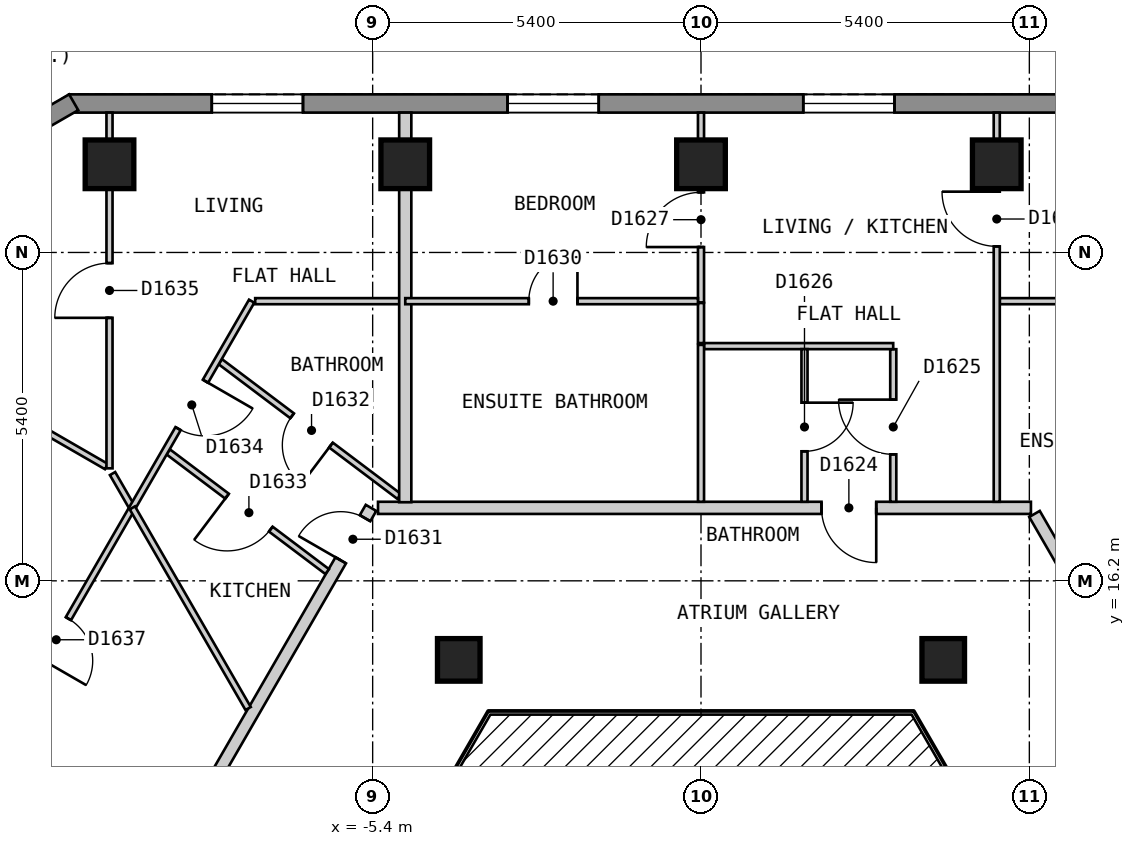
"""IFC4 building model, lengths in metres.
Left out: names, types, materials, properties, quantities, classifications, styles, units other than length and angle.
Written with IfcOpenShell. Run it as: python <this file> out.ifc"""

import sys

from ifc_helpers import new_model, si_unit, direction, frame, frame_2d, origin, origin_2d, place, context, subcontext, project, spatial, polyline, rectangle, outline, extrude, element, fill, save


model = new_model("IFC4")
c1 = context("Model", 3, precision=1e-05, world=origin(), true_north=direction((0.0, 1.0)))
c2 = subcontext(c1, "Body", "Model", "MODEL_VIEW")
j1 = project(units=[si_unit("LENGTHUNIT", "METRE"), si_unit("PLANEANGLEUNIT", "RADIAN")], contexts=[c1])
p1 = place(None, origin())
s1 = spatial("IfcSite", under=j1, at=p1, CompositionType="ELEMENT")
p2 = place(p1, origin())
s2 = spatial("IfcBuilding", under=s1, at=p2, CompositionType="ELEMENT")
p3 = place(p2, frame((0.0, 0.0, 169.2)))
s3 = spatial("IfcBuildingStorey", under=s2, at=p3, CompositionType="ELEMENT", Elevation=169.2)
for number, where, z_axis, x_axis in (
    (1, (4.864, 23.05, 0.0), (0.0, 0.0, 1.0), (-1.0, 0.0, 0.0)),
    (2, (0.0, 23.05, 0.0), (0.0, 0.0, 1.0), (-1.0, 0.0, 0.0)),
    (3, (-4.864, 23.05, 0.0), (0.0, 0.0, 1.0), (-1.0, 0.0, 0.0)),
    (4, (-9.728, 23.05, 0.0), (0.0, 0.0, 1.0), (-1.0, 0.0, 0.0)),
):
    element("IfcColumn", number, at=place(p3, frame(where, z_axis=z_axis, x_axis=x_axis)), inside=s3, PredefinedType="COLUMN", context=c2, shape_type="SweptSolid", body=[
        extrude(rectangle(XDim=0.8, YDim=0.8, at=origin_2d()), origin(), (0.0, 0.0, 1.0), 3.0),
    ])
for number, where, z_axis, x_axis in (
    (5, (3.984, 14.9, 0.0), (0.0, 0.0, 1.0), (1.0, 0.0, 0.0)),
    (6, (-3.984, 14.9, 0.0), (0.0, 0.0, 1.0), (1.0, 0.0, 0.0)),
):
    element("IfcColumn", number, at=place(p3, frame(where, z_axis=z_axis, x_axis=x_axis)), inside=s3, PredefinedType="COLUMN", context=c2, shape_type="SweptSolid", body=[
        extrude(rectangle(XDim=0.7, YDim=0.7, at=origin_2d()), origin(), (0.0, 0.0, 1.0), 3.0),
    ])
p4 = place(p3, frame((10.392, 24.05, 0.0), z_axis=(0.0, 0.0, 1.0), x_axis=(-1.0, 0.0, 0.0)))
e7 = element("IfcWall", 7, at=p4, inside=s3, PredefinedType="SOLIDWALL", context=c2, shape_type="SweptSolid", body=[
    extrude(outline(polyline([(0.0, -0.15), (20.784, -0.15), (20.704, 0.15), (0.08, 0.15), (0.0, -0.15)])), origin(), (0.0, 0.0, 1.0), 2.7),
])
p5 = place(p4, frame((2.346, 0.0, 0.15)))
e8 = element("IfcOpeningElement", 8, at=p5, cuts=e7, PredefinedType="OPENING", context=c2, shape_type="SweptSolid", body=[
    extrude(rectangle(XDim=1.5, YDim=2.1, at=frame_2d((0.75, 1.05))), frame((0.0, 0.16, 0.0), z_axis=(0.0, -1.0, 0.0), x_axis=(1.0, 0.0, 0.0)), (0.0, 0.0, 1.0), 0.32),
])
p6 = place(p4, frame((7.21, 0.0, 0.15)))
e9 = element("IfcOpeningElement", 9, at=p6, cuts=e7, PredefinedType="OPENING", context=c2, shape_type="SweptSolid", body=[
    extrude(rectangle(XDim=1.5, YDim=2.1, at=frame_2d((0.75, 1.05))), frame((0.0, 0.16, 0.0), z_axis=(0.0, -1.0, 0.0), x_axis=(1.0, 0.0, 0.0)), (0.0, 0.0, 1.0), 0.32),
])
p7 = place(p4, frame((12.074, 0.0, 0.15)))
e10 = element("IfcOpeningElement", 10, at=p7, cuts=e7, PredefinedType="OPENING", context=c2, shape_type="SweptSolid", body=[
    extrude(rectangle(XDim=1.5, YDim=2.1, at=frame_2d((0.75, 1.05))), frame((0.0, 0.16, 0.0), z_axis=(0.0, -1.0, 0.0), x_axis=(1.0, 0.0, 0.0)), (0.0, 0.0, 1.0), 0.32),
])
p8 = place(p4, frame((16.938, 0.0, 0.15)))
e11 = element("IfcOpeningElement", 11, at=p8, cuts=e7, PredefinedType="OPENING", context=c2, shape_type="SweptSolid", body=[
    extrude(rectangle(XDim=1.5, YDim=2.1, at=frame_2d((0.75, 1.05))), frame((0.0, 0.16, 0.0), z_axis=(0.0, -1.0, 0.0), x_axis=(1.0, 0.0, 0.0)), (0.0, 0.0, 1.0), 0.32),
])
p9 = place(p3, frame((-10.317, 24.07, 0.0), z_axis=(0.0, 0.0, 1.0), x_axis=(-0.866022959057, -0.500004234368, 0.0)))
e12 = element("IfcWall", 12, at=p9, inside=s3, PredefinedType="SOLIDWALL", context=c2, shape_type="SweptSolid", body=[
    extrude(outline(polyline([(0.0, -0.15), (5.0, -0.15), (4.92, 0.15), (0.08, 0.15), (0.0, -0.15)])), origin(), (0.0, 0.0, 1.0), 2.7),
])
p10 = place(p9, frame((0.65, 0.0, 0.15)))
e13 = element("IfcOpeningElement", 13, at=p10, cuts=e12, PredefinedType="OPENING", context=c2, shape_type="SweptSolid", body=[
    extrude(rectangle(XDim=1.2, YDim=2.1, at=frame_2d((0.6, 1.05))), frame((0.0, 0.16, 0.0), z_axis=(0.0, -1.0, 0.0), x_axis=(1.0, 0.0, 0.0)), (0.0, 0.0, 1.0), 0.32),
])
p11 = place(p3, frame((5.485, 17.3, 0.0), z_axis=(0.0, 0.0, 1.0), x_axis=(0.499965832213, -0.866045129667, 0.0)))
e14 = element("IfcWall", 14, at=p11, inside=s3, PredefinedType="PARTITIONING", context=c2, shape_type="SweptSolid", body=[
    extrude(rectangle(XDim=10.739, YDim=0.2, at=frame_2d((5.369, 0.0))), origin(), (0.0, 0.0, 1.0), 2.7),
])
p12 = place(p11, frame((9.047, 0.0, 0.0)))
e15 = element("IfcOpeningElement", 15, at=p12, cuts=e14, PredefinedType="OPENING", context=c2, shape_type="SweptSolid", body=[
    extrude(rectangle(XDim=1.0, YDim=2.1, at=frame_2d((0.5, 1.05))), frame((0.0, 0.11, 0.0), z_axis=(0.0, -1.0, 0.0), x_axis=(1.0, 0.0, 0.0)), (0.0, 0.0, 1.0), 0.22),
])
p13 = place(p3, frame((-5.312, 17.4, 0.0), z_axis=(0.0, 0.0, 1.0), x_axis=(1.0, 0.0, 0.0)))
e16 = element("IfcWall", 16, at=p13, inside=s3, PredefinedType="PARTITIONING", context=c2, shape_type="SweptSolid", body=[
    extrude(rectangle(XDim=10.738, YDim=0.2, at=frame_2d((5.369, 0.0))), origin(), (0.0, 0.0, 1.0), 2.7),
])
p14 = place(p13, frame((7.294, 0.0, 0.0)))
e17 = element("IfcOpeningElement", 17, at=p14, cuts=e16, PredefinedType="OPENING", context=c2, shape_type="SweptSolid", body=[
    extrude(rectangle(XDim=0.9, YDim=2.1, at=frame_2d((0.45, 1.05))), frame((0.0, 0.11, 0.0), z_axis=(0.0, -1.0, 0.0), x_axis=(1.0, 0.0, 0.0)), (0.0, 0.0, 1.0), 0.22),
])
p15 = place(p3, frame((-10.771, 8.144, 0.0), z_axis=(0.0, 0.0, 1.0), x_axis=(0.500008507724, 0.866020491792, 0.0)))
e18 = element("IfcWall", 18, at=p15, inside=s3, PredefinedType="PARTITIONING", context=c2, shape_type="SweptSolid", body=[
    extrude(rectangle(XDim=10.688, YDim=0.2, at=frame_2d((5.344, 0.0))), origin(), (0.0, 0.0, 1.0), 2.7),
])
p16 = place(p15, frame((9.692, 0.0, 0.0)))
e19 = element("IfcOpeningElement", 19, at=p16, cuts=e18, PredefinedType="OPENING", context=c2, shape_type="SweptSolid", body=[
    extrude(rectangle(XDim=0.8, YDim=2.1, at=frame_2d((0.4, 1.05))), frame((0.0, 0.11, 0.0), z_axis=(0.0, -1.0, 0.0), x_axis=(1.0, 0.0, 0.0)), (0.0, 0.0, 1.0), 0.22),
])
p17 = place(p15, frame((0.549, 0.0, 0.0)))
e20 = element("IfcOpeningElement", 20, at=p17, cuts=e18, PredefinedType="OPENING", context=c2, shape_type="SweptSolid", body=[
    extrude(rectangle(XDim=1.0, YDim=2.1, at=frame_2d((0.5, 1.05))), frame((0.0, 0.11, 0.0), z_axis=(0.0, -1.0, 0.0), x_axis=(1.0, 0.0, 0.0)), (0.0, 0.0, 1.0), 0.22),
])
p18 = place(p3, frame((-9.678, 17.964, 0.0), z_axis=(0.0, 0.0, 1.0), x_axis=(0.500208928872, -0.865904745036, 0.0)))
e21 = element("IfcWall", 21, at=p18, inside=s3, PredefinedType="PARTITIONING", context=c2, shape_type="SweptSolid", body=[
    extrude(rectangle(XDim=0.652, YDim=0.1, at=frame_2d((0.326, 0.0))), origin(), (0.0, 0.0, 1.0), 2.7),
])
p19 = place(p3, frame((0.0, 20.769, 0.0), z_axis=(0.0, 0.0, 1.0), x_axis=(0.0, -1.0, 0.0)))
e22 = element("IfcWall", 22, at=p19, inside=s3, PredefinedType="PARTITIONING", context=c2, shape_type="SweptSolid", body=[
    extrude(rectangle(XDim=0.659, YDim=0.1, at=frame_2d((0.33, 0.0))), origin(), (0.0, 0.0, 1.0), 2.7),
])
p20 = place(p3, frame((3.162, 20.009, 0.0), z_axis=(0.0, 0.0, 1.0), x_axis=(0.0, -1.0, 0.0)))
e23 = element("IfcWall", 23, at=p20, inside=s3, PredefinedType="PARTITIONING", context=c2, shape_type="SweptSolid", body=[
    extrude(rectangle(XDim=2.509, YDim=0.1, at=frame_2d((1.254, 0.0))), origin(), (0.0, 0.0, 1.0), 2.7),
])
p21 = place(p20, frame((0.829, 0.0, 0.0)))
e24 = element("IfcOpeningElement", 24, at=p21, cuts=e23, PredefinedType="OPENING", context=c2, shape_type="SweptSolid", body=[
    extrude(rectangle(XDim=0.9, YDim=2.1, at=frame_2d((0.45, 1.05))), frame((0.0, 0.06, 0.0), z_axis=(0.0, -1.0, 0.0), x_axis=(1.0, 0.0, 0.0)), (0.0, 0.0, 1.0), 0.12),
])
p22 = place(p3, frame((-14.794, 20.975, 0.0), z_axis=(0.0, 0.0, 1.0), x_axis=(0.866019221245, -0.500010708319, 0.0)))
e25 = element("IfcWall", 25, at=p22, inside=s3, PredefinedType="PARTITIONING", context=c2, shape_type="SweptSolid", body=[
    extrude(rectangle(XDim=5.792, YDim=0.1, at=frame_2d((2.896, 0.0))), origin(), (0.0, 0.0, 1.0), 2.7),
])
p23 = place(p22, frame((2.475, 0.0, 0.0)))
e26 = element("IfcOpeningElement", 26, at=p23, cuts=e25, PredefinedType="OPENING", context=c2, shape_type="SweptSolid", body=[
    extrude(rectangle(XDim=0.9, YDim=2.1, at=frame_2d((0.45, 1.05))), frame((0.0, 0.06, 0.0), z_axis=(0.0, -1.0, 0.0), x_axis=(1.0, 0.0, 0.0)), (0.0, 0.0, 1.0), 0.12),
])
p24 = place(p3, frame((-8.763, 18.321, 0.0), z_axis=(0.0, 0.0, 1.0), x_axis=(0.798861914713, -0.601514456369, 0.0)))
e27 = element("IfcWall", 27, at=p24, inside=s3, PredefinedType="PARTITIONING", context=c2, shape_type="SweptSolid", body=[
    extrude(rectangle(XDim=3.273, YDim=0.1, at=frame_2d((1.637, 0.0))), origin(), (0.0, 0.0, 1.0), 2.7),
])
p25 = place(p24, frame((1.212, 0.0, 0.0)))
e28 = element("IfcOpeningElement", 28, at=p25, cuts=e27, PredefinedType="OPENING", context=c2, shape_type="SweptSolid", body=[
    extrude(rectangle(XDim=0.9, YDim=2.1, at=frame_2d((0.45, 1.05))), frame((0.0, 0.06, 0.0), z_axis=(0.0, -1.0, 0.0), x_axis=(1.0, 0.0, 0.0)), (0.0, 0.0, 1.0), 0.12),
])
p26 = place(p3, frame((-7.906, 19.804, 0.0), z_axis=(0.0, 0.0, 1.0), x_axis=(0.798741470056, -0.60167438371, 0.0)))
e29 = element("IfcWall", 29, at=p26, inside=s3, PredefinedType="PARTITIONING", context=c2, shape_type="SweptSolid", body=[
    extrude(rectangle(XDim=3.683, YDim=0.1, at=frame_2d((1.842, 0.0))), origin(), (0.0, 0.0, 1.0), 2.7),
])
p27 = place(p26, frame((1.479, 0.0, 0.0)))
e30 = element("IfcOpeningElement", 30, at=p27, cuts=e29, PredefinedType="OPENING", context=c2, shape_type="SweptSolid", body=[
    extrude(rectangle(XDim=0.8, YDim=2.1, at=frame_2d((0.4, 1.05))), frame((0.0, 0.06, 0.0), z_axis=(0.0, -1.0, 0.0), x_axis=(1.0, 0.0, 0.0)), (0.0, 0.0, 1.0), 0.12),
])
p28 = place(p3, frame((0.05, 20.06, 0.0), z_axis=(0.0, 0.0, 1.0), x_axis=(1.0, 0.0, 0.0)))
e31 = element("IfcWall", 31, at=p28, inside=s3, PredefinedType="PARTITIONING", context=c2, shape_type="SweptSolid", body=[
    extrude(rectangle(XDim=3.111, YDim=0.1, at=frame_2d((1.555, 0.0))), origin(), (0.0, 0.0, 1.0), 2.7),
])
p29 = place(p3, frame((-7.332, 20.799, 0.0), z_axis=(0.0, 0.0, 1.0), x_axis=(1.0, 0.0, 0.0)))
e32 = element("IfcWall", 32, at=p29, inside=s3, PredefinedType="PARTITIONING", context=c2, shape_type="SweptSolid", body=[
    extrude(rectangle(XDim=2.468, YDim=0.1, at=frame_2d((1.234, 0.0))), origin(), (0.0, 0.0, 1.0), 2.7),
])
p30 = place(p3, frame((4.914, 20.799, 0.0), z_axis=(0.0, 0.0, 1.0), x_axis=(1.0, 0.0, 0.0)))
e33 = element("IfcWall", 33, at=p30, inside=s3, PredefinedType="PARTITIONING", context=c2, shape_type="SweptSolid", body=[
    extrude(rectangle(XDim=2.475, YDim=0.1, at=frame_2d((1.237, 0.0))), origin(), (0.0, 0.0, 1.0), 2.7),
])
p31 = place(p3, frame((-11.806, 13.149, 0.0), z_axis=(0.0, 0.0, 1.0), x_axis=(0.499932199895, 0.866064544655, 0.0)))
e34 = element("IfcWall", 34, at=p31, inside=s3, PredefinedType="PARTITIONING", context=c2, shape_type="SweptSolid", body=[
    extrude(rectangle(XDim=8.833, YDim=0.1, at=frame_2d((4.417, 0.0))), origin(), (0.0, 0.0, 1.0), 2.7),
])
p32 = place(p31, frame((6.413, 0.0, 0.0)))
e35 = element("IfcOpeningElement", 35, at=p32, cuts=e34, PredefinedType="OPENING", context=c2, shape_type="SweptSolid", body=[
    extrude(rectangle(XDim=0.9, YDim=2.1, at=frame_2d((0.45, 1.05))), frame((0.0, 0.06, 0.0), z_axis=(0.0, -1.0, 0.0), x_axis=(1.0, 0.0, 0.0)), (0.0, 0.0, 1.0), 0.12),
])
p33 = place(p31, frame((2.004, 0.0, 0.0)))
e36 = element("IfcOpeningElement", 36, at=p33, cuts=e34, PredefinedType="OPENING", context=c2, shape_type="SweptSolid", body=[
    extrude(rectangle(XDim=0.8, YDim=2.1, at=frame_2d((0.4, 1.05))), frame((0.0, 0.06, 0.0), z_axis=(0.0, -1.0, 0.0), x_axis=(1.0, 0.0, 0.0)), (0.0, 0.0, 1.0), 0.12),
])
p34 = place(p3, frame((4.864, 17.5, 0.0), z_axis=(0.0, 0.0, 1.0), x_axis=(0.0, 1.0, 0.0)))
e37 = element("IfcWall", 37, at=p34, inside=s3, PredefinedType="PARTITIONING", context=c2, shape_type="SweptSolid", body=[
    extrude(rectangle(XDim=6.4, YDim=0.1, at=frame_2d((3.2, 0.0))), origin(), (0.0, 0.0, 1.0), 2.7),
])
p35 = place(p34, frame((4.2, 0.0, 0.0)))
e38 = element("IfcOpeningElement", 38, at=p35, cuts=e37, PredefinedType="OPENING", context=c2, shape_type="SweptSolid", body=[
    extrude(rectangle(XDim=0.9, YDim=2.1, at=frame_2d((0.45, 1.05))), frame((0.0, 0.06, 0.0), z_axis=(0.0, -1.0, 0.0), x_axis=(1.0, 0.0, 0.0)), (0.0, 0.0, 1.0), 0.12),
])
p36 = place(p3, frame((1.702, 17.5, 0.0), z_axis=(0.0, 0.0, 1.0), x_axis=(0.0, 1.0, 0.0)))
e39 = element("IfcWall", 39, at=p36, inside=s3, PredefinedType="PARTITIONING", context=c2, shape_type="SweptSolid", body=[
    extrude(rectangle(XDim=2.51, YDim=0.1, at=frame_2d((1.255, 0.0))), origin(), (0.0, 0.0, 1.0), 2.7),
])
p37 = place(p36, frame((0.83, 0.0, 0.0)))
e40 = element("IfcOpeningElement", 40, at=p37, cuts=e39, PredefinedType="OPENING", context=c2, shape_type="SweptSolid", body=[
    extrude(rectangle(XDim=0.8, YDim=2.1, at=frame_2d((0.4, 1.05))), frame((0.0, 0.06, 0.0), z_axis=(0.0, -1.0, 0.0), x_axis=(1.0, 0.0, 0.0)), (0.0, 0.0, 1.0), 0.12),
])
p38 = place(p3, frame((0.0, 17.5, 0.0), z_axis=(0.0, 0.0, 1.0), x_axis=(0.0, 1.0, 0.0)))
e41 = element("IfcWall", 41, at=p38, inside=s3, PredefinedType="PARTITIONING", context=c2, shape_type="SweptSolid", body=[
    extrude(rectangle(XDim=2.58, YDim=0.1, at=frame_2d((1.29, 0.0))), origin(), (0.0, 0.0, 1.0), 2.7),
])
p39 = place(p3, frame((0.0, 20.779, 0.0), z_axis=(0.0, 0.0, 1.0), x_axis=(0.0, 1.0, 0.0)))
e42 = element("IfcWall", 42, at=p39, inside=s3, PredefinedType="PARTITIONING", context=c2, shape_type="SweptSolid", body=[
    extrude(rectangle(XDim=3.121, YDim=0.1, at=frame_2d((1.561, 0.0))), origin(), (0.0, 0.0, 1.0), 2.7),
])
p40 = place(p39, frame((0.91, 0.0, 0.0)))
e43 = element("IfcOpeningElement", 43, at=p40, cuts=e42, PredefinedType="OPENING", context=c2, shape_type="SweptSolid", body=[
    extrude(rectangle(XDim=0.9, YDim=2.1, at=frame_2d((0.45, 1.05))), frame((0.0, 0.06, 0.0), z_axis=(0.0, -1.0, 0.0), x_axis=(1.0, 0.0, 0.0)), (0.0, 0.0, 1.0), 0.12),
])
p41 = place(p3, frame((-9.728, 18.05, 0.0), z_axis=(0.0, 0.0, 1.0), x_axis=(0.0, 1.0, 0.0)))
e44 = element("IfcWall", 44, at=p41, inside=s3, PredefinedType="PARTITIONING", context=c2, shape_type="SweptSolid", body=[
    extrude(rectangle(XDim=5.85, YDim=0.1, at=frame_2d((2.925, 0.0))), origin(), (0.0, 0.0, 1.0), 2.7),
])
p42 = place(p41, frame((2.475, 0.0, 0.0)))
e45 = element("IfcOpeningElement", 45, at=p42, cuts=e44, PredefinedType="OPENING", context=c2, shape_type="SweptSolid", body=[
    extrude(rectangle(XDim=0.9, YDim=2.1, at=frame_2d((0.45, 1.05))), frame((0.0, 0.06, 0.0), z_axis=(0.0, -1.0, 0.0), x_axis=(1.0, 0.0, 0.0)), (0.0, 0.0, 1.0), 0.12),
])
p43 = place(p3, frame((-4.864, 17.493, 0.0), z_axis=(0.0, 0.0, 1.0), x_axis=(0.0, 1.0, 0.0)))
e46 = element("IfcWall", 46, at=p43, inside=s3, PredefinedType="PARTITIONING", context=c2, shape_type="SweptSolid", body=[
    extrude(rectangle(XDim=6.407, YDim=0.2, at=frame_2d((3.204, 0.0))), origin(), (0.0, 0.0, 1.0), 2.7),
])
p44 = place(p3, frame((-9.352, 17.4, 0.0), z_axis=(0.0, 0.0, 1.0), x_axis=(0.499785326313, -0.866149310225, 0.0)))
e47 = element("IfcWall", 47, at=p44, inside=s3, PredefinedType="PARTITIONING", context=c2, shape_type="SweptSolid", body=[
    extrude(rectangle(XDim=3.81, YDim=0.1, at=frame_2d((1.905, 0.0))), origin(), (0.0, 0.0, 1.0), 2.7),
])
p45 = place(p3, frame((-4.864, 20.799, 0.0), z_axis=(0.0, 0.0, 1.0), x_axis=(1.0, 0.0, 0.0)))
e48 = element("IfcWall", 48, at=p45, inside=s3, PredefinedType="PARTITIONING", context=c2, shape_type="SweptSolid", body=[
    extrude(rectangle(XDim=4.814, YDim=0.1, at=frame_2d((2.407, 0.0))), origin(), (0.0, 0.0, 1.0), 2.7),
])
p46 = place(p45, frame((2.032, 0.0, 0.0)))
e49 = element("IfcOpeningElement", 49, at=p46, cuts=e48, PredefinedType="OPENING", context=c2, shape_type="SweptSolid", body=[
    extrude(rectangle(XDim=0.8, YDim=2.1, at=frame_2d((0.4, 1.05))), frame((0.0, 0.06, 0.0), z_axis=(0.0, -1.0, 0.0), x_axis=(1.0, 0.0, 0.0)), (0.0, 0.0, 1.0), 0.12),
])
p47 = place(p6, origin())
e50 = element("IfcWindow", 50, at=p47, inside=s3, PartitioningType="SINGLE_PANEL", PredefinedType="WINDOW", context=c2, shape_type="SweptSolid", body=[
    extrude(rectangle(XDim=1.5, YDim=2.1, at=frame_2d((0.75, 1.05))), frame((0.0, 0.03, 0.0), z_axis=(0.0, -1.0, 0.0), x_axis=(1.0, 0.0, 0.0)), (0.0, 0.0, 1.0), 0.06),
])
fill(e9, e50)
p48 = place(p7, origin())
e51 = element("IfcWindow", 51, at=p48, inside=s3, PartitioningType="SINGLE_PANEL", PredefinedType="WINDOW", context=c2, shape_type="SweptSolid", body=[
    extrude(rectangle(XDim=1.5, YDim=2.1, at=frame_2d((0.75, 1.05))), frame((0.0, 0.03, 0.0), z_axis=(0.0, -1.0, 0.0), x_axis=(1.0, 0.0, 0.0)), (0.0, 0.0, 1.0), 0.06),
])
fill(e10, e51)
p49 = place(p8, origin())
e52 = element("IfcWindow", 52, at=p49, inside=s3, PartitioningType="SINGLE_PANEL", PredefinedType="WINDOW", context=c2, shape_type="SweptSolid", body=[
    extrude(rectangle(XDim=1.5, YDim=2.1, at=frame_2d((0.75, 1.05))), frame((0.0, 0.03, 0.0), z_axis=(0.0, -1.0, 0.0), x_axis=(1.0, 0.0, 0.0)), (0.0, 0.0, 1.0), 0.06),
])
fill(e11, e52)
p50 = place(p14, origin())
e53 = element("IfcDoor", 53, at=p50, inside=s3, OperationType="SINGLE_SWING_RIGHT", PredefinedType="DOOR", context=c2, shape_type="SweptSolid", body=[
    extrude(rectangle(XDim=0.9, YDim=2.1, at=frame_2d((0.45, 1.05))), frame((0.0, 0.025, 0.0), z_axis=(0.0, -1.0, 0.0), x_axis=(1.0, 0.0, 0.0)), (0.0, 0.0, 1.0), 0.05),
])
fill(e17, e53)
p51 = place(p21, origin())
e54 = element("IfcDoor", 54, at=p51, inside=s3, OperationType="SINGLE_SWING_LEFT", PredefinedType="DOOR", context=c2, shape_type="SweptSolid", body=[
    extrude(rectangle(XDim=0.9, YDim=2.1, at=frame_2d((0.45, 1.05))), frame((0.0, 0.025, 0.0), z_axis=(0.0, -1.0, 0.0), x_axis=(1.0, 0.0, 0.0)), (0.0, 0.0, 1.0), 0.05),
])
fill(e24, e54)
p52 = place(p37, origin())
e55 = element("IfcDoor", 55, at=p52, inside=s3, OperationType="SINGLE_SWING_RIGHT", PredefinedType="DOOR", context=c2, shape_type="SweptSolid", body=[
    extrude(rectangle(XDim=0.8, YDim=2.1, at=frame_2d((0.4, 1.05))), frame((0.0, 0.025, 0.0), z_axis=(0.0, -1.0, 0.0), x_axis=(1.0, 0.0, 0.0)), (0.0, 0.0, 1.0), 0.05),
])
fill(e40, e55)
p53 = place(p40, origin())
e56 = element("IfcDoor", 56, at=p53, inside=s3, OperationType="SINGLE_SWING_LEFT", PredefinedType="DOOR", context=c2, shape_type="SweptSolid", body=[
    extrude(rectangle(XDim=0.9, YDim=2.1, at=frame_2d((0.45, 1.05))), frame((0.0, 0.025, 0.0), z_axis=(0.0, -1.0, 0.0), x_axis=(1.0, 0.0, 0.0)), (0.0, 0.0, 1.0), 0.05),
])
fill(e43, e56)
p54 = place(p35, origin())
e57 = element("IfcDoor", 57, at=p54, inside=s3, OperationType="SINGLE_SWING_RIGHT", PredefinedType="DOOR", context=c2, shape_type="SweptSolid", body=[
    extrude(rectangle(XDim=0.9, YDim=2.1, at=frame_2d((0.45, 1.05))), frame((0.0, 0.025, 0.0), z_axis=(0.0, -1.0, 0.0), x_axis=(1.0, 0.0, 0.0)), (0.0, 0.0, 1.0), 0.05),
])
fill(e38, e57)
p55 = place(p46, origin())
e58 = element("IfcDoor", 58, at=p55, inside=s3, OperationType="SINGLE_SWING_RIGHT", PredefinedType="DOOR", context=c2, shape_type="SweptSolid", body=[
    extrude(rectangle(XDim=0.8, YDim=2.1, at=frame_2d((0.4, 1.05))), frame((0.0, 0.025, 0.0), z_axis=(0.0, -1.0, 0.0), x_axis=(1.0, 0.0, 0.0)), (0.0, 0.0, 1.0), 0.05),
])
fill(e49, e58)
p56 = place(p16, origin())
e59 = element("IfcDoor", 59, at=p56, inside=s3, OperationType="SINGLE_SWING_LEFT", PredefinedType="DOOR", context=c2, shape_type="SweptSolid", body=[
    extrude(rectangle(XDim=0.8, YDim=2.1, at=frame_2d((0.4, 1.05))), frame((0.0, 0.025, 0.0), z_axis=(0.0, -1.0, 0.0), x_axis=(1.0, 0.0, 0.0)), (0.0, 0.0, 1.0), 0.05),
])
fill(e19, e59)
p57 = place(p27, origin())
e60 = element("IfcDoor", 60, at=p57, inside=s3, OperationType="SINGLE_SWING_RIGHT", PredefinedType="DOOR", context=c2, shape_type="SweptSolid", body=[
    extrude(rectangle(XDim=0.8, YDim=2.1, at=frame_2d((0.4, 1.05))), frame((0.0, 0.025, 0.0), z_axis=(0.0, -1.0, 0.0), x_axis=(1.0, 0.0, 0.0)), (0.0, 0.0, 1.0), 0.05),
])
fill(e30, e60)
p58 = place(p25, origin())
e61 = element("IfcDoor", 61, at=p58, inside=s3, OperationType="SINGLE_SWING_LEFT", PredefinedType="DOOR", context=c2, shape_type="SweptSolid", body=[
    extrude(rectangle(XDim=0.9, YDim=2.1, at=frame_2d((0.45, 1.05))), frame((0.0, 0.025, 0.0), z_axis=(0.0, -1.0, 0.0), x_axis=(1.0, 0.0, 0.0)), (0.0, 0.0, 1.0), 0.05),
])
fill(e28, e61)
p59 = place(p32, origin())
e62 = element("IfcDoor", 62, at=p59, inside=s3, OperationType="SINGLE_SWING_RIGHT", PredefinedType="DOOR", context=c2, shape_type="SweptSolid", body=[
    extrude(rectangle(XDim=0.9, YDim=2.1, at=frame_2d((0.45, 1.05))), frame((0.0, 0.025, 0.0), z_axis=(0.0, -1.0, 0.0), x_axis=(1.0, 0.0, 0.0)), (0.0, 0.0, 1.0), 0.05),
])
fill(e35, e62)
p60 = place(p42, origin())
e63 = element("IfcDoor", 63, at=p60, inside=s3, OperationType="SINGLE_SWING_LEFT", PredefinedType="DOOR", context=c2, shape_type="SweptSolid", body=[
    extrude(rectangle(XDim=0.9, YDim=2.1, at=frame_2d((0.45, 1.05))), frame((0.0, 0.025, 0.0), z_axis=(0.0, -1.0, 0.0), x_axis=(1.0, 0.0, 0.0)), (0.0, 0.0, 1.0), 0.05),
])
fill(e45, e63)
p61 = place(p33, origin())
e64 = element("IfcDoor", 64, at=p61, inside=s3, OperationType="SINGLE_SWING_LEFT", PredefinedType="DOOR", context=c2, shape_type="SweptSolid", body=[
    extrude(rectangle(XDim=0.8, YDim=2.1, at=frame_2d((0.4, 1.05))), frame((0.0, 0.025, 0.0), z_axis=(0.0, -1.0, 0.0), x_axis=(1.0, 0.0, 0.0)), (0.0, 0.0, 1.0), 0.05),
])
fill(e36, e64)
save(model, sys.argv[1])
